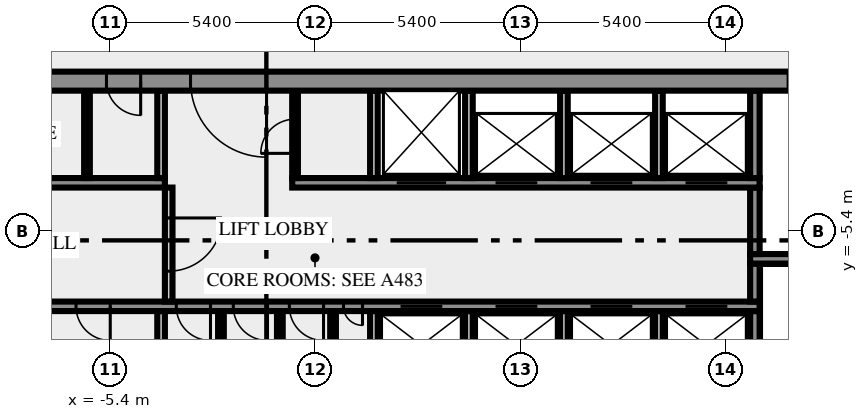
"""IFC4 building model, lengths in metres.
Left out: names, types, materials, properties, quantities, classifications, styles, units other than length and angle.
Written with IfcOpenShell. Run it as: python <this file> out.ifc"""

import sys

from ifc_helpers import new_model, si_unit, direction, frame, frame_2d, origin, place, context, subcontext, project, spatial, rectangle, extrude, element, fill, save


model = new_model("IFC4")
c1 = context("Model", 3, precision=1e-05, world=origin(), true_north=direction((0.0, 1.0)))
c2 = subcontext(c1, "Body", "Model", "MODEL_VIEW")
j1 = project(units=[si_unit("LENGTHUNIT", "METRE"), si_unit("PLANEANGLEUNIT", "RADIAN")], contexts=[c1])
p1 = place(None, origin())
s1 = spatial("IfcSite", under=j1, at=p1, CompositionType="ELEMENT")
p2 = place(p1, origin())
s2 = spatial("IfcBuilding", under=s1, at=p2, CompositionType="ELEMENT")
p3 = place(p2, frame((0.0, 0.0, 164.0)))
s3 = spatial("IfcBuildingStorey", under=s2, at=p3, CompositionType="ELEMENT", Elevation=164.0)
p4 = place(p3, frame((-4.05, -10.5, 0.0), z_axis=(0.0, 0.0, 1.0), x_axis=(0.0, 1.0, 0.0)))
e1 = element("IfcWall", 1, at=p4, inside=s3, PredefinedType="SOLIDWALL", context=c2, shape_type="SweptSolid", body=[
    extrude(rectangle(XDim=3.0, YDim=0.2, at=frame_2d((1.5, 0.0))), origin(), (0.0, 0.0, 1.0), 3.65),
])
for number, where, z_axis, x_axis in (
    (2, (-2.475, -10.5, 0.0), (0.0, 0.0, 1.0), (0.0, 1.0, 0.0)),
    (3, (-0.925, -10.5, 0.0), (0.0, 0.0, 1.0), (0.0, 1.0, 0.0)),
    (4, (0.475, -10.5, 0.0), (0.0, 0.0, 1.0), (0.0, 1.0, 0.0)),
):
    element("IfcWall", number, at=place(p3, frame(where, z_axis=z_axis, x_axis=x_axis)), inside=s3, PredefinedType="PARTITIONING", context=c2, shape_type="SweptSolid", body=[
        extrude(rectangle(XDim=3.0, YDim=0.15, at=frame_2d((1.5, 0.0))), origin(), (0.0, 0.0, 1.0), 3.65),
    ])
for number, where, z_axis, x_axis in (
    (5, (1.55, -10.5, 0.0), (0.0, 0.0, 1.0), (0.0, 1.0, 0.0)),
    (6, (4.05, -10.5, 0.0), (0.0, 0.0, 1.0), (0.0, 1.0, 0.0)),
    (7, (6.55, -10.5, 0.0), (0.0, 0.0, 1.0), (0.0, 1.0, 0.0)),
    (8, (9.05, -10.5, 0.0), (0.0, 0.0, 1.0), (0.0, 1.0, 0.0)),
):
    element("IfcWall", number, at=place(p3, frame(where, z_axis=z_axis, x_axis=x_axis)), inside=s3, PredefinedType="SOLIDWALL", context=c2, shape_type="SweptSolid", body=[
        extrude(rectangle(XDim=3.0, YDim=0.2, at=frame_2d((1.5, 0.0))), origin(), (0.0, 0.0, 1.0), 3.65),
    ])
p5 = place(p3, frame((11.575, -10.5, 0.0), z_axis=(0.0, 0.0, 1.0), x_axis=(0.0, 1.0, 0.0)))
e9 = element("IfcWall", 9, at=p5, inside=s3, PredefinedType="SHEAR", context=c2, shape_type="SweptSolid", body=[
    extrude(rectangle(XDim=3.0, YDim=0.25, at=frame_2d((1.5, 0.0))), origin(), (0.0, 0.0, 1.0), 3.65),
])
p6 = place(p3, frame((11.7, -7.375, 0.0), z_axis=(0.0, 0.0, 1.0), x_axis=(-1.0, 0.0, 0.0)))
e10 = element("IfcWall", 10, at=p6, inside=s3, PredefinedType="SHEAR", context=c2, shape_type="SweptSolid", body=[
    extrude(rectangle(XDim=23.4, YDim=0.25, at=frame_2d((11.7, 0.0))), origin(), (0.0, 0.0, 1.0), 3.65),
])
p7 = place(p6, frame((22.012, 0.0, 0.0)))
e11 = element("IfcOpeningElement", 11, at=p7, cuts=e10, PredefinedType="OPENING", context=c2, shape_type="SweptSolid", body=[
    extrude(rectangle(XDim=0.9, YDim=2.1, at=frame_2d((0.45, 1.05))), frame((0.0, 0.135, 0.0), z_axis=(0.0, -1.0, 0.0), x_axis=(1.0, 0.0, 0.0)), (0.0, 0.0, 1.0), 0.27),
])
p8 = place(p6, frame((20.05, 0.0, 0.0)))
e12 = element("IfcOpeningElement", 12, at=p8, cuts=e10, PredefinedType="OPENING", context=c2, shape_type="SweptSolid", body=[
    extrude(rectangle(XDim=0.9, YDim=2.1, at=frame_2d((0.45, 1.05))), frame((0.0, 0.135, 0.0), z_axis=(0.0, -1.0, 0.0), x_axis=(1.0, 0.0, 0.0)), (0.0, 0.0, 1.0), 0.27),
])
p9 = place(p6, frame((17.088, 0.0, 0.0)))
e13 = element("IfcOpeningElement", 13, at=p9, cuts=e10, PredefinedType="OPENING", context=c2, shape_type="SweptSolid", body=[
    extrude(rectangle(XDim=0.9, YDim=2.1, at=frame_2d((0.45, 1.05))), frame((0.0, 0.135, 0.0), z_axis=(0.0, -1.0, 0.0), x_axis=(1.0, 0.0, 0.0)), (0.0, 0.0, 1.0), 0.27),
])
p10 = place(p6, frame((14.45, 0.0, 0.0)))
e14 = element("IfcOpeningElement", 14, at=p10, cuts=e10, PredefinedType="OPENING", context=c2, shape_type="SweptSolid", body=[
    extrude(rectangle(XDim=0.9, YDim=2.1, at=frame_2d((0.45, 1.05))), frame((0.0, 0.135, 0.0), z_axis=(0.0, -1.0, 0.0), x_axis=(1.0, 0.0, 0.0)), (0.0, 0.0, 1.0), 0.27),
])
p11 = place(p6, frame((12.95, 0.0, 0.0)))
e15 = element("IfcOpeningElement", 15, at=p11, cuts=e10, PredefinedType="OPENING", context=c2, shape_type="SweptSolid", body=[
    extrude(rectangle(XDim=0.9, YDim=2.1, at=frame_2d((0.45, 1.05))), frame((0.0, 0.135, 0.0), z_axis=(0.0, -1.0, 0.0), x_axis=(1.0, 0.0, 0.0)), (0.0, 0.0, 1.0), 0.27),
])
p12 = place(p6, frame((11.475, 0.0, 0.0)))
e16 = element("IfcOpeningElement", 16, at=p12, cuts=e10, PredefinedType="OPENING", context=c2, shape_type="SweptSolid", body=[
    extrude(rectangle(XDim=0.9, YDim=2.1, at=frame_2d((0.45, 1.05))), frame((0.0, 0.135, 0.0), z_axis=(0.0, -1.0, 0.0), x_axis=(1.0, 0.0, 0.0)), (0.0, 0.0, 1.0), 0.27),
])
p13 = place(p6, frame((10.45, 0.0, 0.0)))
e17 = element("IfcOpeningElement", 17, at=p13, cuts=e10, PredefinedType="OPENING", context=c2, shape_type="SweptSolid", body=[
    extrude(rectangle(XDim=0.5, YDim=2.1, at=frame_2d((0.25, 1.05))), frame((0.0, 0.135, 0.0), z_axis=(0.0, -1.0, 0.0), x_axis=(1.0, 0.0, 0.0)), (0.0, 0.0, 1.0), 0.27),
])
p14 = place(p6, frame((8.35, 0.0, 0.0)))
e18 = element("IfcOpeningElement", 18, at=p14, cuts=e10, PredefinedType="OPENING", context=c2, shape_type="SweptSolid", body=[
    extrude(rectangle(XDim=1.1, YDim=2.1, at=frame_2d((0.55, 1.05))), frame((0.0, 0.135, 0.0), z_axis=(0.0, -1.0, 0.0), x_axis=(1.0, 0.0, 0.0)), (0.0, 0.0, 1.0), 0.27),
])
p15 = place(p6, frame((5.85, 0.0, 0.0)))
e19 = element("IfcOpeningElement", 19, at=p15, cuts=e10, PredefinedType="OPENING", context=c2, shape_type="SweptSolid", body=[
    extrude(rectangle(XDim=1.1, YDim=2.1, at=frame_2d((0.55, 1.05))), frame((0.0, 0.135, 0.0), z_axis=(0.0, -1.0, 0.0), x_axis=(1.0, 0.0, 0.0)), (0.0, 0.0, 1.0), 0.27),
])
p16 = place(p6, frame((3.35, 0.0, 0.0)))
e20 = element("IfcOpeningElement", 20, at=p16, cuts=e10, PredefinedType="OPENING", context=c2, shape_type="SweptSolid", body=[
    extrude(rectangle(XDim=1.1, YDim=2.1, at=frame_2d((0.55, 1.05))), frame((0.0, 0.135, 0.0), z_axis=(0.0, -1.0, 0.0), x_axis=(1.0, 0.0, 0.0)), (0.0, 0.0, 1.0), 0.27),
])
p17 = place(p6, frame((0.85, 0.0, 0.0)))
e21 = element("IfcOpeningElement", 21, at=p17, cuts=e10, PredefinedType="OPENING", context=c2, shape_type="SweptSolid", body=[
    extrude(rectangle(XDim=1.1, YDim=2.1, at=frame_2d((0.55, 1.05))), frame((0.0, 0.135, 0.0), z_axis=(0.0, -1.0, 0.0), x_axis=(1.0, 0.0, 0.0)), (0.0, 0.0, 1.0), 0.27),
])
p18 = place(p3, frame((-3.85, -4.25, 0.0), z_axis=(0.0, 0.0, 1.0), x_axis=(0.0, -1.0, 0.0)))
e22 = element("IfcWall", 22, at=p18, inside=s3, PredefinedType="SOLIDWALL", context=c2, shape_type="SweptSolid", body=[
    extrude(rectangle(XDim=3.0, YDim=0.2, at=frame_2d((1.5, 0.0))), origin(), (0.0, 0.0, 1.0), 3.65),
])
p19 = place(p18, frame((0.8, 0.0, 0.0)))
e23 = element("IfcOpeningElement", 23, at=p19, cuts=e22, PredefinedType="OPENING", context=c2, shape_type="SweptSolid", body=[
    extrude(rectangle(XDim=1.4, YDim=2.1, at=frame_2d((0.7, 1.05))), frame((0.0, 0.11, 0.0), z_axis=(0.0, -1.0, 0.0), x_axis=(1.0, 0.0, 0.0)), (0.0, 0.0, 1.0), 0.22),
])
p20 = place(p3, frame((11.575, -7.25, 0.0), z_axis=(0.0, 0.0, 1.0), x_axis=(0.0, 1.0, 0.0)))
e24 = element("IfcWall", 24, at=p20, inside=s3, PredefinedType="SHEAR", context=c2, shape_type="SweptSolid", body=[
    extrude(rectangle(XDim=1.0, YDim=0.25, at=frame_2d((0.5, 0.0))), origin(), (0.0, 0.0, 1.0), 3.65),
])
p21 = place(p3, frame((19.5, -6.125, 0.0), z_axis=(0.0, 0.0, 1.0), x_axis=(-1.0, 0.0, 0.0)))
e25 = element("IfcWall", 25, at=p21, inside=s3, PredefinedType="SHEAR", context=c2, shape_type="SweptSolid", body=[
    extrude(rectangle(XDim=8.05, YDim=0.25, at=frame_2d((4.025, 0.0))), origin(), (0.0, 0.0, 1.0), 3.65),
])
p22 = place(p21, frame((0.05, 0.0, 0.0)))
e26 = element("IfcOpeningElement", 26, at=p22, cuts=e25, PredefinedType="OPENING", context=c2, shape_type="SweptSolid", body=[
    extrude(rectangle(XDim=1.8, YDim=2.1, at=frame_2d((0.9, 1.05))), frame((0.0, 0.135, 0.0), z_axis=(0.0, -1.0, 0.0), x_axis=(1.0, 0.0, 0.0)), (0.0, 0.0, 1.0), 0.27),
])
p23 = place(p3, frame((11.575, -6.0, 0.0), z_axis=(0.0, 0.0, 1.0), x_axis=(0.0, 1.0, 0.0)))
e27 = element("IfcWall", 27, at=p23, inside=s3, PredefinedType="SHEAR", context=c2, shape_type="SweptSolid", body=[
    extrude(rectangle(XDim=1.75, YDim=0.25, at=frame_2d((0.875, 0.0))), origin(), (0.0, 0.0, 1.0), 3.65),
])
p24 = place(p3, frame((-11.7, -4.125, 0.0), z_axis=(0.0, 0.0, 1.0), x_axis=(1.0, 0.0, 0.0)))
e28 = element("IfcWall", 28, at=p24, inside=s3, PredefinedType="SHEAR", context=c2, shape_type="SweptSolid", body=[
    extrude(rectangle(XDim=7.75, YDim=0.25, at=frame_2d((3.875, 0.0))), origin(), (0.0, 0.0, 1.0), 3.65),
])
p25 = place(p3, frame((-0.6, -4.125, 0.0), z_axis=(0.0, 0.0, 1.0), x_axis=(1.0, 0.0, 0.0)))
e29 = element("IfcWall", 29, at=p25, inside=s3, PredefinedType="SHEAR", context=c2, shape_type="SweptSolid", body=[
    extrude(rectangle(XDim=12.3, YDim=0.25, at=frame_2d((6.15, 0.0))), origin(), (0.0, 0.0, 1.0), 3.65),
])
p26 = place(p25, frame((2.75, 0.0, 0.0)))
e30 = element("IfcOpeningElement", 30, at=p26, cuts=e29, PredefinedType="OPENING", context=c2, shape_type="SweptSolid", body=[
    extrude(rectangle(XDim=1.3, YDim=2.1, at=frame_2d((0.65, 1.05))), frame((0.0, 0.135, 0.0), z_axis=(0.0, -1.0, 0.0), x_axis=(1.0, 0.0, 0.0)), (0.0, 0.0, 1.0), 0.27),
])
p27 = place(p25, frame((5.35, 0.0, 0.0)))
e31 = element("IfcOpeningElement", 31, at=p27, cuts=e29, PredefinedType="OPENING", context=c2, shape_type="SweptSolid", body=[
    extrude(rectangle(XDim=1.1, YDim=2.1, at=frame_2d((0.55, 1.05))), frame((0.0, 0.135, 0.0), z_axis=(0.0, -1.0, 0.0), x_axis=(1.0, 0.0, 0.0)), (0.0, 0.0, 1.0), 0.27),
])
p28 = place(p25, frame((7.85, 0.0, 0.0)))
e32 = element("IfcOpeningElement", 32, at=p28, cuts=e29, PredefinedType="OPENING", context=c2, shape_type="SweptSolid", body=[
    extrude(rectangle(XDim=1.1, YDim=2.1, at=frame_2d((0.55, 1.05))), frame((0.0, 0.135, 0.0), z_axis=(0.0, -1.0, 0.0), x_axis=(1.0, 0.0, 0.0)), (0.0, 0.0, 1.0), 0.27),
])
p29 = place(p25, frame((10.35, 0.0, 0.0)))
e33 = element("IfcOpeningElement", 33, at=p29, cuts=e29, PredefinedType="OPENING", context=c2, shape_type="SweptSolid", body=[
    extrude(rectangle(XDim=1.1, YDim=2.1, at=frame_2d((0.55, 1.05))), frame((0.0, 0.135, 0.0), z_axis=(0.0, -1.0, 0.0), x_axis=(1.0, 0.0, 0.0)), (0.0, 0.0, 1.0), 0.27),
])
p30 = place(p3, frame((-6.0, -4.0, 0.0), z_axis=(0.0, 0.0, 1.0), x_axis=(0.0, 1.0, 0.0)))
e34 = element("IfcWall", 34, at=p30, inside=s3, PredefinedType="PARTITIONING", context=c2, shape_type="SweptSolid", body=[
    extrude(rectangle(XDim=2.3, YDim=0.15, at=frame_2d((1.15, 0.0))), origin(), (0.0, 0.0, 1.0), 3.65),
])
p31 = place(p3, frame((-4.05, -4.0, 0.0), z_axis=(0.0, 0.0, 1.0), x_axis=(0.0, 1.0, 0.0)))
e35 = element("IfcWall", 35, at=p31, inside=s3, PredefinedType="SOLIDWALL", context=c2, shape_type="SweptSolid", body=[
    extrude(rectangle(XDim=2.3, YDim=0.2, at=frame_2d((1.15, 0.0))), origin(), (0.0, 0.0, 1.0), 3.65),
])
p32 = place(p3, frame((-0.525, -4.0, 0.0), z_axis=(0.0, 0.0, 1.0), x_axis=(0.0, 1.0, 0.0)))
e36 = element("IfcWall", 36, at=p32, inside=s3, PredefinedType="PARTITIONING", context=c2, shape_type="SweptSolid", body=[
    extrude(rectangle(XDim=2.3, YDim=0.15, at=frame_2d((1.15, 0.0))), origin(), (0.0, 0.0, 1.0), 3.65),
])
p33 = place(p32, frame((0.65, 0.0, 0.0)))
e37 = element("IfcOpeningElement", 37, at=p33, cuts=e36, PredefinedType="OPENING", context=c2, shape_type="SweptSolid", body=[
    extrude(rectangle(XDim=0.9, YDim=2.1, at=frame_2d((0.45, 1.05))), frame((0.0, 0.085, 0.0), z_axis=(0.0, -1.0, 0.0), x_axis=(1.0, 0.0, 0.0)), (0.0, 0.0, 1.0), 0.17),
])
for number, where, z_axis, x_axis in (
    (38, (1.55, -4.0, 0.0), (0.0, 0.0, 1.0), (0.0, 1.0, 0.0)),
    (39, (4.05, -4.0, 0.0), (0.0, 0.0, 1.0), (0.0, 1.0, 0.0)),
    (40, (6.55, -4.0, 0.0), (0.0, 0.0, 1.0), (0.0, 1.0, 0.0)),
    (41, (9.05, -4.0, 0.0), (0.0, 0.0, 1.0), (0.0, 1.0, 0.0)),
):
    element("IfcWall", number, at=place(p3, frame(where, z_axis=z_axis, x_axis=x_axis)), inside=s3, PredefinedType="SOLIDWALL", context=c2, shape_type="SweptSolid", body=[
        extrude(rectangle(XDim=2.3, YDim=0.2, at=frame_2d((1.15, 0.0))), origin(), (0.0, 0.0, 1.0), 3.65),
    ])
p34 = place(p3, frame((11.575, -4.0, 0.0), z_axis=(0.0, 0.0, 1.0), x_axis=(0.0, 1.0, 0.0)))
e42 = element("IfcWall", 42, at=p34, inside=s3, PredefinedType="SHEAR", context=c2, shape_type="SweptSolid", body=[
    extrude(rectangle(XDim=2.3, YDim=0.25, at=frame_2d((1.15, 0.0))), origin(), (0.0, 0.0, 1.0), 3.65),
])
p35 = place(p3, frame((20.49, -1.45, 0.0), z_axis=(0.0, 0.0, 1.0), x_axis=(-1.0, 0.0, 0.0)))
e43 = element("IfcWall", 43, at=p35, inside=s3, PredefinedType="SHEAR", context=c2, shape_type="SweptSolid", body=[
    extrude(rectangle(XDim=40.98, YDim=0.5, at=frame_2d((20.49, 0.0))), origin(), (0.0, 0.0, 1.0), 3.65),
])
p36 = place(p35, frame((38.14, 0.0, 0.0)))
e44 = element("IfcOpeningElement", 44, at=p36, cuts=e43, PredefinedType="OPENING", context=c2, shape_type="SweptSolid", body=[
    extrude(rectangle(XDim=1.8, YDim=2.1, at=frame_2d((0.9, 1.05))), frame((0.0, 0.26, 0.0), z_axis=(0.0, -1.0, 0.0), x_axis=(1.0, 0.0, 0.0)), (0.0, 0.0, 1.0), 0.52),
])
p37 = place(p35, frame((35.89, 0.0, 0.0)))
e45 = element("IfcOpeningElement", 45, at=p37, cuts=e43, PredefinedType="OPENING", context=c2, shape_type="SweptSolid", body=[
    extrude(rectangle(XDim=0.9, YDim=2.1, at=frame_2d((0.45, 1.05))), frame((0.0, 0.26, 0.0), z_axis=(0.0, -1.0, 0.0), x_axis=(1.0, 0.0, 0.0)), (0.0, 0.0, 1.0), 0.52),
])
p38 = place(p35, frame((32.94, 0.0, 0.0)))
e46 = element("IfcOpeningElement", 46, at=p38, cuts=e43, PredefinedType="OPENING", context=c2, shape_type="SweptSolid", body=[
    extrude(rectangle(XDim=0.9, YDim=2.1, at=frame_2d((0.45, 1.05))), frame((0.0, 0.26, 0.0), z_axis=(0.0, -1.0, 0.0), x_axis=(1.0, 0.0, 0.0)), (0.0, 0.0, 1.0), 0.52),
])
p39 = place(p35, frame((28.802, 0.0, 0.0)))
e47 = element("IfcOpeningElement", 47, at=p39, cuts=e43, PredefinedType="OPENING", context=c2, shape_type="SweptSolid", body=[
    extrude(rectangle(XDim=0.9, YDim=2.1, at=frame_2d((0.45, 1.05))), frame((0.0, 0.26, 0.0), z_axis=(0.0, -1.0, 0.0), x_axis=(1.0, 0.0, 0.0)), (0.0, 0.0, 1.0), 0.52),
])
p40 = place(p35, frame((25.077, 0.0, 0.0)))
e48 = element("IfcOpeningElement", 48, at=p40, cuts=e43, PredefinedType="OPENING", context=c2, shape_type="SweptSolid", body=[
    extrude(rectangle(XDim=0.9, YDim=2.1, at=frame_2d((0.45, 1.05))), frame((0.0, 0.26, 0.0), z_axis=(0.0, -1.0, 0.0), x_axis=(1.0, 0.0, 0.0)), (0.0, 0.0, 1.0), 0.52),
])
p41 = place(p35, frame((21.765, 0.0, 0.0)))
e49 = element("IfcOpeningElement", 49, at=p41, cuts=e43, PredefinedType="OPENING", context=c2, shape_type="SweptSolid", body=[
    extrude(rectangle(XDim=2.0, YDim=2.1, at=frame_2d((1.0, 1.05))), frame((0.0, 0.26, 0.0), z_axis=(0.0, -1.0, 0.0), x_axis=(1.0, 0.0, 0.0)), (0.0, 0.0, 1.0), 0.52),
])
p42 = place(p35, frame((7.14, 0.0, 0.0)))
e50 = element("IfcOpeningElement", 50, at=p42, cuts=e43, PredefinedType="OPENING", context=c2, shape_type="SweptSolid", body=[
    extrude(rectangle(XDim=0.9, YDim=2.1, at=frame_2d((0.45, 1.05))), frame((0.0, 0.26, 0.0), z_axis=(0.0, -1.0, 0.0), x_axis=(1.0, 0.0, 0.0)), (0.0, 0.0, 1.0), 0.52),
])
p43 = place(p35, frame((5.028, 0.0, 0.0)))
e51 = element("IfcOpeningElement", 51, at=p43, cuts=e43, PredefinedType="OPENING", context=c2, shape_type="SweptSolid", body=[
    extrude(rectangle(XDim=0.8, YDim=2.1, at=frame_2d((0.4, 1.05))), frame((0.0, 0.26, 0.0), z_axis=(0.0, -1.0, 0.0), x_axis=(1.0, 0.0, 0.0)), (0.0, 0.0, 1.0), 0.52),
])
p44 = place(p35, frame((3.452, 0.0, 0.0)))
e52 = element("IfcOpeningElement", 52, at=p44, cuts=e43, PredefinedType="OPENING", context=c2, shape_type="SweptSolid", body=[
    extrude(rectangle(XDim=0.8, YDim=2.1, at=frame_2d((0.4, 1.05))), frame((0.0, 0.26, 0.0), z_axis=(0.0, -1.0, 0.0), x_axis=(1.0, 0.0, 0.0)), (0.0, 0.0, 1.0), 0.52),
])
p45 = place(p35, frame((1.04, 0.0, 0.0)))
e53 = element("IfcOpeningElement", 53, at=p45, cuts=e43, PredefinedType="OPENING", context=c2, shape_type="SweptSolid", body=[
    extrude(rectangle(XDim=1.8, YDim=2.1, at=frame_2d((0.9, 1.05))), frame((0.0, 0.26, 0.0), z_axis=(0.0, -1.0, 0.0), x_axis=(1.0, 0.0, 0.0)), (0.0, 0.0, 1.0), 0.52),
])
p46 = place(p9, origin())
e54 = element("IfcDoor", 54, at=p46, inside=s3, OperationType="SINGLE_SWING_RIGHT", PredefinedType="DOOR", context=c2, shape_type="SweptSolid", body=[
    extrude(rectangle(XDim=0.9, YDim=2.1, at=frame_2d((0.45, 1.05))), frame((0.0, 0.025, 0.0), z_axis=(0.0, -1.0, 0.0), x_axis=(1.0, 0.0, 0.0)), (0.0, 0.0, 1.0), 0.05),
])
fill(e13, e54)
p47 = place(p10, origin())
e55 = element("IfcDoor", 55, at=p47, inside=s3, OperationType="SINGLE_SWING_RIGHT", PredefinedType="DOOR", context=c2, shape_type="SweptSolid", body=[
    extrude(rectangle(XDim=0.9, YDim=2.1, at=frame_2d((0.45, 1.05))), frame((0.0, 0.025, 0.0), z_axis=(0.0, -1.0, 0.0), x_axis=(1.0, 0.0, 0.0)), (0.0, 0.0, 1.0), 0.05),
])
fill(e14, e55)
p48 = place(p11, origin())
e56 = element("IfcDoor", 56, at=p48, inside=s3, OperationType="SINGLE_SWING_RIGHT", PredefinedType="DOOR", context=c2, shape_type="SweptSolid", body=[
    extrude(rectangle(XDim=0.9, YDim=2.1, at=frame_2d((0.45, 1.05))), frame((0.0, 0.025, 0.0), z_axis=(0.0, -1.0, 0.0), x_axis=(1.0, 0.0, 0.0)), (0.0, 0.0, 1.0), 0.05),
])
fill(e15, e56)
p49 = place(p12, origin())
e57 = element("IfcDoor", 57, at=p49, inside=s3, OperationType="SINGLE_SWING_RIGHT", PredefinedType="DOOR", context=c2, shape_type="SweptSolid", body=[
    extrude(rectangle(XDim=0.9, YDim=2.1, at=frame_2d((0.45, 1.05))), frame((0.0, 0.025, 0.0), z_axis=(0.0, -1.0, 0.0), x_axis=(1.0, 0.0, 0.0)), (0.0, 0.0, 1.0), 0.05),
])
fill(e16, e57)
p50 = place(p13, origin())
e58 = element("IfcDoor", 58, at=p50, inside=s3, OperationType="SINGLE_SWING_LEFT", PredefinedType="DOOR", context=c2, shape_type="SweptSolid", body=[
    extrude(rectangle(XDim=0.5, YDim=2.1, at=frame_2d((0.25, 1.05))), frame((0.0, 0.025, 0.0), z_axis=(0.0, -1.0, 0.0), x_axis=(1.0, 0.0, 0.0)), (0.0, 0.0, 1.0), 0.05),
])
fill(e17, e58)
p51 = place(p14, origin())
e59 = element("IfcDoor", 59, at=p51, inside=s3, OperationType="DOUBLE_DOOR_SLIDING", PredefinedType="DOOR", context=c2, shape_type="SweptSolid", body=[
    extrude(rectangle(XDim=1.1, YDim=2.1, at=frame_2d((0.55, 1.05))), frame((0.0, 0.025, 0.0), z_axis=(0.0, -1.0, 0.0), x_axis=(1.0, 0.0, 0.0)), (0.0, 0.0, 1.0), 0.05),
])
fill(e18, e59)
p52 = place(p15, origin())
e60 = element("IfcDoor", 60, at=p52, inside=s3, OperationType="DOUBLE_DOOR_SLIDING", PredefinedType="DOOR", context=c2, shape_type="SweptSolid", body=[
    extrude(rectangle(XDim=1.1, YDim=2.1, at=frame_2d((0.55, 1.05))), frame((0.0, 0.025, 0.0), z_axis=(0.0, -1.0, 0.0), x_axis=(1.0, 0.0, 0.0)), (0.0, 0.0, 1.0), 0.05),
])
fill(e19, e60)
p53 = place(p16, origin())
e61 = element("IfcDoor", 61, at=p53, inside=s3, OperationType="DOUBLE_DOOR_SLIDING", PredefinedType="DOOR", context=c2, shape_type="SweptSolid", body=[
    extrude(rectangle(XDim=1.1, YDim=2.1, at=frame_2d((0.55, 1.05))), frame((0.0, 0.025, 0.0), z_axis=(0.0, -1.0, 0.0), x_axis=(1.0, 0.0, 0.0)), (0.0, 0.0, 1.0), 0.05),
])
fill(e20, e61)
p54 = place(p17, origin())
e62 = element("IfcDoor", 62, at=p54, inside=s3, OperationType="DOUBLE_DOOR_SLIDING", PredefinedType="DOOR", context=c2, shape_type="SweptSolid", body=[
    extrude(rectangle(XDim=1.1, YDim=2.1, at=frame_2d((0.55, 1.05))), frame((0.0, 0.025, 0.0), z_axis=(0.0, -1.0, 0.0), x_axis=(1.0, 0.0, 0.0)), (0.0, 0.0, 1.0), 0.05),
])
fill(e21, e62)
p55 = place(p19, origin())
e63 = element("IfcDoor", 63, at=p55, inside=s3, OperationType="DOUBLE_DOOR_SINGLE_SWING", PredefinedType="DOOR", context=c2, shape_type="SweptSolid", body=[
    extrude(rectangle(XDim=1.4, YDim=2.1, at=frame_2d((0.7, 1.05))), frame((0.0, 0.025, 0.0), z_axis=(0.0, -1.0, 0.0), x_axis=(1.0, 0.0, 0.0)), (0.0, 0.0, 1.0), 0.05),
])
fill(e23, e63)
p56 = place(p26, origin())
e64 = element("IfcDoor", 64, at=p56, inside=s3, OperationType="DOUBLE_DOOR_SLIDING", PredefinedType="DOOR", context=c2, shape_type="SweptSolid", body=[
    extrude(rectangle(XDim=1.3, YDim=2.1, at=frame_2d((0.65, 1.05))), frame((0.0, 0.025, 0.0), z_axis=(0.0, -1.0, 0.0), x_axis=(1.0, 0.0, 0.0)), (0.0, 0.0, 1.0), 0.05),
])
fill(e30, e64)
p57 = place(p27, origin())
e65 = element("IfcDoor", 65, at=p57, inside=s3, OperationType="DOUBLE_DOOR_SLIDING", PredefinedType="DOOR", context=c2, shape_type="SweptSolid", body=[
    extrude(rectangle(XDim=1.1, YDim=2.1, at=frame_2d((0.55, 1.05))), frame((0.0, 0.025, 0.0), z_axis=(0.0, -1.0, 0.0), x_axis=(1.0, 0.0, 0.0)), (0.0, 0.0, 1.0), 0.05),
])
fill(e31, e65)
p58 = place(p28, origin())
e66 = element("IfcDoor", 66, at=p58, inside=s3, OperationType="DOUBLE_DOOR_SLIDING", PredefinedType="DOOR", context=c2, shape_type="SweptSolid", body=[
    extrude(rectangle(XDim=1.1, YDim=2.1, at=frame_2d((0.55, 1.05))), frame((0.0, 0.025, 0.0), z_axis=(0.0, -1.0, 0.0), x_axis=(1.0, 0.0, 0.0)), (0.0, 0.0, 1.0), 0.05),
])
fill(e32, e66)
p59 = place(p29, origin())
e67 = element("IfcDoor", 67, at=p59, inside=s3, OperationType="DOUBLE_DOOR_SLIDING", PredefinedType="DOOR", context=c2, shape_type="SweptSolid", body=[
    extrude(rectangle(XDim=1.1, YDim=2.1, at=frame_2d((0.55, 1.05))), frame((0.0, 0.025, 0.0), z_axis=(0.0, -1.0, 0.0), x_axis=(1.0, 0.0, 0.0)), (0.0, 0.0, 1.0), 0.05),
])
fill(e33, e67)
p60 = place(p33, origin())
e68 = element("IfcDoor", 68, at=p60, inside=s3, OperationType="SINGLE_SWING_LEFT", PredefinedType="DOOR", context=c2, shape_type="SweptSolid", body=[
    extrude(rectangle(XDim=0.9, YDim=2.1, at=frame_2d((0.45, 1.05))), frame((0.0, 0.025, 0.0), z_axis=(0.0, -1.0, 0.0), x_axis=(1.0, 0.0, 0.0)), (0.0, 0.0, 1.0), 0.05),
])
fill(e37, e68)
p61 = place(p40, origin())
e69 = element("IfcDoor", 69, at=p61, inside=s3, OperationType="SINGLE_SWING_RIGHT", PredefinedType="DOOR", context=c2, shape_type="SweptSolid", body=[
    extrude(rectangle(XDim=0.9, YDim=2.1, at=frame_2d((0.45, 1.05))), frame((0.0, 0.025, 0.0), z_axis=(0.0, -1.0, 0.0), x_axis=(1.0, 0.0, 0.0)), (0.0, 0.0, 1.0), 0.05),
])
fill(e48, e69)
p62 = place(p41, origin())
e70 = element("IfcDoor", 70, at=p62, inside=s3, OperationType="DOUBLE_DOOR_SINGLE_SWING", PredefinedType="DOOR", context=c2, shape_type="SweptSolid", body=[
    extrude(rectangle(XDim=2.0, YDim=2.1, at=frame_2d((1.0, 1.05))), frame((0.0, 0.025, 0.0), z_axis=(0.0, -1.0, 0.0), x_axis=(1.0, 0.0, 0.0)), (0.0, 0.0, 1.0), 0.05),
])
fill(e49, e70)
save(model, sys.argv[1])
